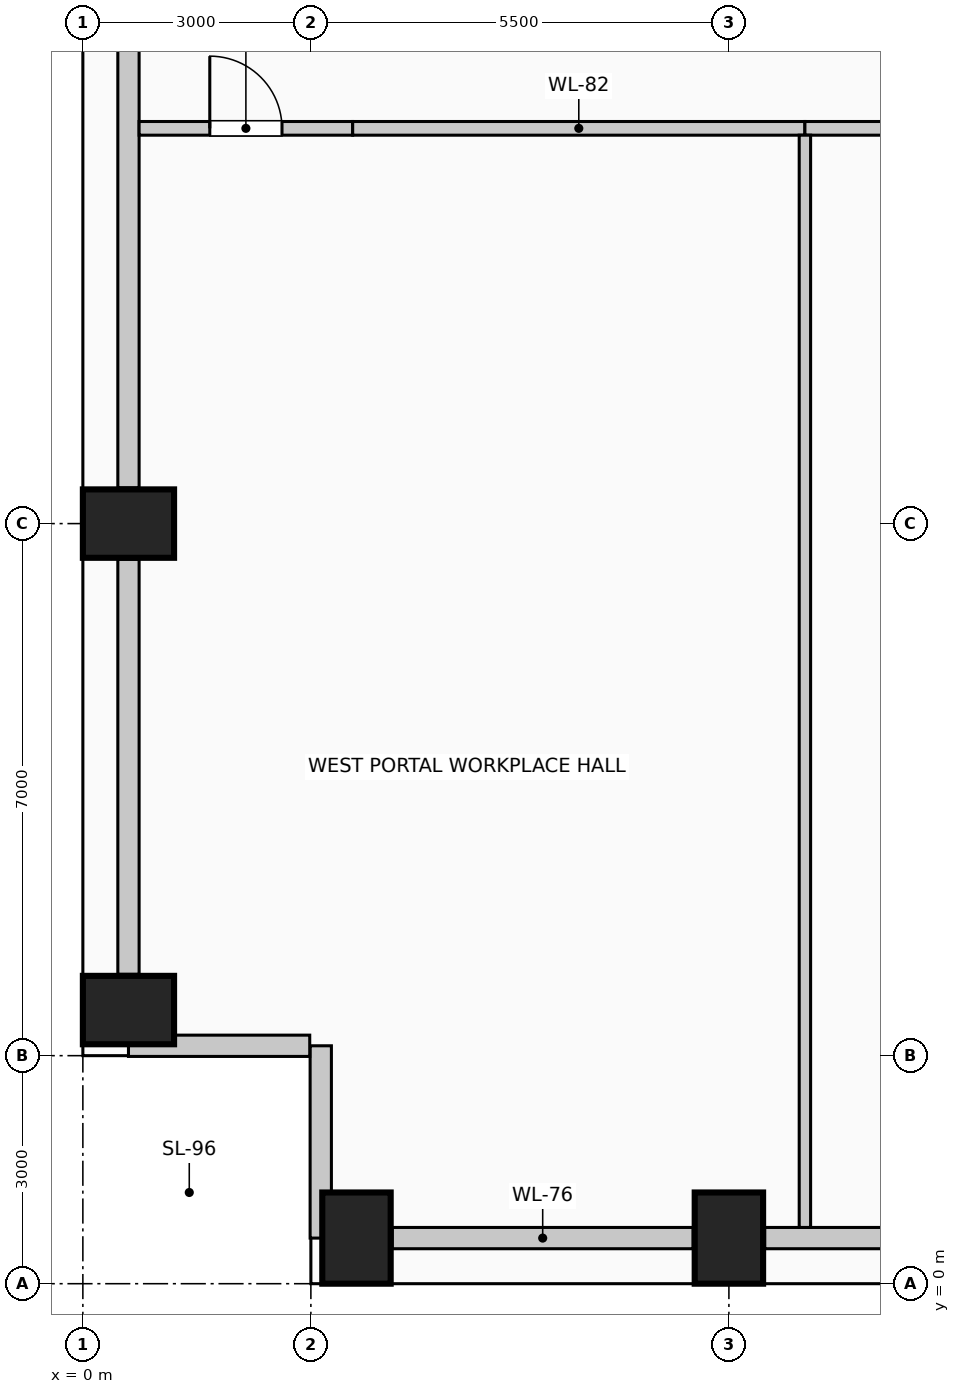
"""IFC4 building model, lengths in metres.
Left out: names, types, materials, properties, quantities, classifications, styles, units other than length and angle.
Written with IfcOpenShell. Run it as: python <this file> out.ifc"""

import sys

from ifc_helpers import new_model, si_unit, direction, frame, frame_2d, origin, origin_2d, place, context, subcontext, project, spatial, rectangle, extrude, element, fill, save


model = new_model("IFC4")
c1 = context("Model", 3, precision=1e-05, world=origin(), true_north=direction((0.0, 1.0)))
c2 = subcontext(c1, "Body", "Model", "MODEL_VIEW")
j1 = project(units=[si_unit("LENGTHUNIT", "METRE"), si_unit("PLANEANGLEUNIT", "RADIAN")], contexts=[c1])
p1 = place(None, origin())
s1 = spatial("IfcSite", under=j1, at=p1, CompositionType="ELEMENT")
p2 = place(p1, origin())
s2 = spatial("IfcBuilding", under=s1, at=p2, CompositionType="ELEMENT")
p3 = place(p2, frame((0.0, 0.0, 42.6)))
s3 = spatial("IfcBuildingStorey", under=s2, at=p3, CompositionType="ELEMENT", Elevation=42.6)
for number, where, z_axis, x_axis in (
    (1, (3.6, 0.6, 0.0), (0.0, 0.0, 1.0), (1.0, 0.0, 0.0)),
    (2, (8.5, 0.6, 0.0), (0.0, 0.0, 1.0), (1.0, 0.0, 0.0)),
    (3, (0.6, 3.6, 0.0), (0.0, 0.0, 1.0), (0.0, 1.0, 0.0)),
    (4, (0.6, 10.0, 0.0), (0.0, 0.0, 1.0), (0.0, 1.0, 0.0)),
):
    element("IfcColumn", number, at=place(p3, frame(where, z_axis=z_axis, x_axis=x_axis)), inside=s3, PredefinedType="COLUMN", context=c2, shape_type="SweptSolid", body=[
        extrude(rectangle(XDim=0.9, YDim=1.2, at=origin_2d()), origin(), (0.0, 0.0, 1.0), 4.0),
    ])
p4 = place(p3, frame((8.03, 0.6, 0.0), z_axis=(0.0, 0.0, 1.0), x_axis=(-1.0, 0.0, 0.0)))
e5 = element("IfcWall", 5, at=p4, inside=s3, PredefinedType="SOLIDWALL", context=c2, shape_type="SweptSolid", body=[
    extrude(rectangle(XDim=3.96, YDim=0.28, at=frame_2d((1.98, 0.0))), origin(), (0.0, 0.0, 1.0), 2.85),
])
p5 = place(p3, frame((13.53, 0.6, 0.0), z_axis=(0.0, 0.0, 1.0), x_axis=(-1.0, 0.0, 0.0)))
e6 = element("IfcWall", 6, at=p5, inside=s3, PredefinedType="SOLIDWALL", context=c2, shape_type="SweptSolid", body=[
    extrude(rectangle(XDim=4.56, YDim=0.28, at=frame_2d((2.28, 0.0))), origin(), (0.0, 0.0, 1.0), 2.85),
])
p6 = place(p3, frame((0.6, 4.07, 0.0), z_axis=(0.0, 0.0, 1.0), x_axis=(0.0, 1.0, 0.0)))
e7 = element("IfcWall", 7, at=p6, inside=s3, PredefinedType="SOLIDWALL", context=c2, shape_type="SweptSolid", body=[
    extrude(rectangle(XDim=5.46, YDim=0.28, at=frame_2d((2.73, 0.0))), origin(), (0.0, 0.0, 1.0), 2.85),
])
p7 = place(p3, frame((0.6, 10.47, 0.0), z_axis=(0.0, 0.0, 1.0), x_axis=(0.0, 1.0, 0.0)))
e8 = element("IfcWall", 8, at=p7, inside=s3, PredefinedType="SOLIDWALL", context=c2, shape_type="SweptSolid", body=[
    extrude(rectangle(XDim=7.06, YDim=0.28, at=frame_2d((3.53, 0.0))), origin(), (0.0, 0.0, 1.0), 2.85),
])
p8 = place(p3, frame((3.13, 0.6, 0.0), z_axis=(0.0, 0.0, 1.0), x_axis=(0.0, 1.0, 0.0)))
e9 = element("IfcWall", 9, at=p8, inside=s3, PredefinedType="SOLIDWALL", context=c2, shape_type="SweptSolid", body=[
    extrude(rectangle(XDim=2.53, YDim=0.28, at=frame_2d((1.265, 0.0))), origin(), (0.0, 0.0, 1.0), 3.7),
])
p9 = place(p3, frame((2.985, 3.13, 0.0), z_axis=(0.0, 0.0, 1.0), x_axis=(-1.0, 0.0, 0.0)))
e10 = element("IfcWall", 10, at=p9, inside=s3, PredefinedType="SOLIDWALL", context=c2, shape_type="SweptSolid", body=[
    extrude(rectangle(XDim=2.385, YDim=0.28, at=frame_2d((1.192, 0.0))), origin(), (0.0, 0.0, 1.0), 3.7),
])
p10 = place(p3, frame((0.74, 15.2, 0.0), z_axis=(0.0, 0.0, 1.0), x_axis=(1.0, 0.0, 0.0)))
e11 = element("IfcWall", 11, at=p10, inside=s3, PredefinedType="PARTITIONING", context=c2, shape_type="SweptSolid", body=[
    extrude(rectangle(XDim=2.81, YDim=0.18, at=frame_2d((1.405, 0.0))), origin(), (0.0, 0.0, 1.0), 3.7),
])
p11 = place(p10, frame((0.93, 0.0, 0.0)))
e12 = element("IfcOpeningElement", 12, at=p11, cuts=e11, PredefinedType="OPENING", context=c2, shape_type="SweptSolid", body=[
    extrude(rectangle(XDim=0.95, YDim=2.15, at=frame_2d((0.475, 1.075))), frame((0.0, 0.1, 0.0), z_axis=(0.0, -1.0, 0.0), x_axis=(1.0, 0.0, 0.0)), (0.0, 0.0, 1.0), 0.2),
])
p12 = place(p3, frame((3.55, 15.2, 0.0), z_axis=(0.0, 0.0, 1.0), x_axis=(1.0, 0.0, 0.0)))
e13 = element("IfcWall", 13, at=p12, inside=s3, PredefinedType="PARTITIONING", context=c2, shape_type="SweptSolid", body=[
    extrude(rectangle(XDim=5.95, YDim=0.18, at=frame_2d((2.975, 0.0))), origin(), (0.0, 0.0, 1.0), 3.7),
])
p13 = place(p3, frame((9.5, 15.2, 0.0), z_axis=(0.0, 0.0, 1.0), x_axis=(1.0, 0.0, 0.0)))
e14 = element("IfcWall", 14, at=p13, inside=s3, PredefinedType="PARTITIONING", context=c2, shape_type="SweptSolid", body=[
    extrude(rectangle(XDim=7.38, YDim=0.18, at=frame_2d((3.69, 0.0))), origin(), (0.0, 0.0, 1.0), 3.7),
])
p14 = place(p13, frame((3.215, 0.0, 0.0)))
e15 = element("IfcOpeningElement", 15, at=p14, cuts=e14, PredefinedType="OPENING", context=c2, shape_type="SweptSolid", body=[
    extrude(rectangle(XDim=0.95, YDim=2.15, at=frame_2d((0.475, 1.075))), frame((0.0, 0.1, 0.0), z_axis=(0.0, -1.0, 0.0), x_axis=(1.0, 0.0, 0.0)), (0.0, 0.0, 1.0), 0.2),
])
p15 = place(p3, frame((9.5, 0.74, 0.0), z_axis=(0.0, 0.0, 1.0), x_axis=(0.0, 1.0, 0.0)))
e16 = element("IfcWall", 16, at=p15, inside=s3, PredefinedType="PARTITIONING", context=c2, shape_type="SweptSolid", body=[
    extrude(rectangle(XDim=14.37, YDim=0.15, at=frame_2d((7.185, 0.0))), origin(), (0.0, 0.0, 1.0), 3.7),
])
p16 = place(p11, origin())
e17 = element("IfcDoor", 17, at=p16, inside=s3, OperationType="SINGLE_SWING_LEFT", PredefinedType="DOOR", context=c2, shape_type="SweptSolid", body=[
    extrude(rectangle(XDim=0.95, YDim=2.15, at=frame_2d((0.475, 1.075))), frame((0.0, 0.025, 0.0), z_axis=(0.0, -1.0, 0.0), x_axis=(1.0, 0.0, 0.0)), (0.0, 0.0, 1.0), 0.05),
])
fill(e12, e17)
save(model, sys.argv[1])
